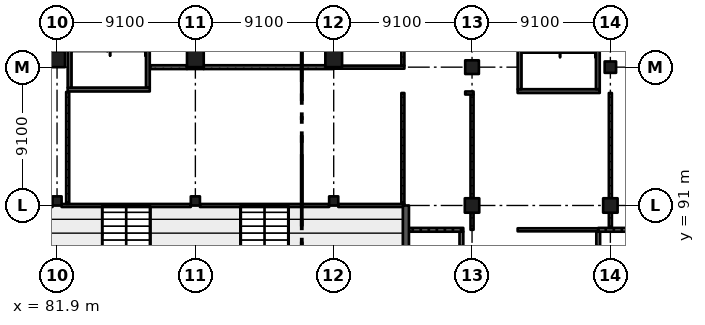
"""IFC4 building model, lengths in metres.
Left out: names, types, materials, properties, quantities, classifications, styles, units other than length and angle.
Written with IfcOpenShell. Run it as: python <this file> out.ifc"""

import sys

from ifc_helpers import new_model, si_unit, direction, frame, frame_2d, origin, origin_2d, place, context, subcontext, project, spatial, rectangle, extrude, element, fill, save


model = new_model("IFC4")
c1 = context("Model", 3, precision=1e-05, world=origin(), true_north=direction((0.0, 1.0)))
c2 = subcontext(c1, "Body", "Model", "MODEL_VIEW")
j1 = project(units=[si_unit("LENGTHUNIT", "METRE"), si_unit("PLANEANGLEUNIT", "RADIAN")], contexts=[c1])
p1 = place(None, origin())
s1 = spatial("IfcSite", under=j1, at=p1, CompositionType="ELEMENT")
p2 = place(p1, origin())
s2 = spatial("IfcBuilding", under=s1, at=p2, CompositionType="ELEMENT")
p3 = place(p2, origin())
s3 = spatial("IfcBuildingStorey", under=s2, at=p3, CompositionType="ELEMENT", Elevation=0.0)
p4 = place(p3, frame((81.9, 91.3, -0.4), z_axis=(0.0, 0.0, 1.0), x_axis=(1.0, 0.0, 0.0)))
e1 = element("IfcColumn", 1, at=p4, inside=s3, PredefinedType="COLUMN", context=c2, shape_type="SweptSolid", body=[
    extrude(rectangle(XDim=0.6, YDim=0.6, at=origin_2d()), origin(), (0.0, 0.0, 1.0), 6.77),
])
p5 = place(p3, frame((81.9, 100.625, -0.4), z_axis=(0.0, 0.0, 1.0), x_axis=(1.0, 0.0, 0.0)))
e2 = element("IfcColumn", 2, at=p5, inside=s3, PredefinedType="COLUMN", context=c2, shape_type="SweptSolid", body=[
    extrude(rectangle(XDim=1.05, YDim=1.05, at=origin_2d()), origin(), (0.0, 0.0, 1.0), 6.77),
])
p6 = place(p3, frame((91.0, 91.3, -0.4), z_axis=(0.0, 0.0, 1.0), x_axis=(1.0, 0.0, 0.0)))
e3 = element("IfcColumn", 3, at=p6, inside=s3, PredefinedType="COLUMN", context=c2, shape_type="SweptSolid", body=[
    extrude(rectangle(XDim=0.6, YDim=0.6, at=origin_2d()), origin(), (0.0, 0.0, 1.0), 6.77),
])
p7 = place(p3, frame((91.0, 100.65, -0.4), z_axis=(0.0, 0.0, 1.0), x_axis=(1.0, 0.0, 0.0)))
e4 = element("IfcColumn", 4, at=p7, inside=s3, PredefinedType="COLUMN", context=c2, shape_type="SweptSolid", body=[
    extrude(rectangle(XDim=1.1, YDim=1.1, at=origin_2d()), origin(), (0.0, 0.0, 1.0), 6.77),
])
p8 = place(p3, frame((100.1, 91.3, -0.4), z_axis=(0.0, 0.0, 1.0), x_axis=(1.0, 0.0, 0.0)))
e5 = element("IfcColumn", 5, at=p8, inside=s3, PredefinedType="COLUMN", context=c2, shape_type="SweptSolid", body=[
    extrude(rectangle(XDim=0.6, YDim=0.6, at=origin_2d()), origin(), (0.0, 0.0, 1.0), 6.77),
])
p9 = place(p3, frame((100.1, 100.65, -0.4), z_axis=(0.0, 0.0, 1.0), x_axis=(1.0, 0.0, 0.0)))
e6 = element("IfcColumn", 6, at=p9, inside=s3, PredefinedType="COLUMN", context=c2, shape_type="SweptSolid", body=[
    extrude(rectangle(XDim=1.1, YDim=1.1, at=origin_2d()), origin(), (0.0, 0.0, 1.0), 6.77),
])
p10 = place(p3, frame((109.2, 91.0, -0.4), z_axis=(0.0, 0.0, 1.0), x_axis=(1.0, 0.0, 0.0)))
e7 = element("IfcColumn", 7, at=p10, inside=s3, PredefinedType="COLUMN", context=c2, shape_type="SweptSolid", body=[
    extrude(rectangle(XDim=0.95, YDim=0.95, at=origin_2d()), origin(), (0.0, 0.0, 1.0), 6.77),
])
p11 = place(p3, frame((109.2, 100.1, -0.4), z_axis=(0.0, 0.0, 1.0), x_axis=(1.0, 0.0, 0.0)))
e8 = element("IfcColumn", 8, at=p11, inside=s3, PredefinedType="COLUMN", context=c2, shape_type="SweptSolid", body=[
    extrude(rectangle(XDim=0.9, YDim=0.9, at=origin_2d()), origin(), (0.0, 0.0, 1.0), 6.77),
])
p12 = place(p3, frame((118.3, 91.0, -0.4), z_axis=(0.0, 0.0, 1.0), x_axis=(1.0, 0.0, 0.0)))
e9 = element("IfcColumn", 9, at=p12, inside=s3, PredefinedType="COLUMN", context=c2, shape_type="SweptSolid", body=[
    extrude(rectangle(XDim=0.95, YDim=0.95, at=origin_2d()), origin(), (0.0, 0.0, 1.0), 6.77),
])
p13 = place(p3, frame((118.3, 100.1, -0.4), z_axis=(0.0, 0.0, 1.0), x_axis=(1.0, 0.0, 0.0)))
e10 = element("IfcColumn", 10, at=p13, inside=s3, PredefinedType="COLUMN", context=c2, shape_type="SweptSolid", body=[
    extrude(rectangle(XDim=0.75, YDim=0.75, at=origin_2d()), origin(), (0.0, 0.0, 1.0), 6.77),
])
p14 = place(p3, frame((104.85, 72.8, -0.4), z_axis=(0.0, 0.0, 1.0), x_axis=(0.0, 1.0, 0.0)))
e11 = element("IfcWall", 11, at=p14, inside=s3, PredefinedType="SHEAR", context=c2, shape_type="SweptSolid", body=[
    extrude(rectangle(XDim=18.2, YDim=0.4, at=frame_2d((9.1, 0.0))), origin(), (0.0, 0.0, 1.0), 6.77),
])
p15 = place(p3, frame((117.6, 98.525, -0.4), z_axis=(0.0, 0.0, 1.0), x_axis=(-1.0, 0.0, 0.0)))
e12 = element("IfcWall", 12, at=p15, inside=s3, PredefinedType="SHEAR", context=c2, shape_type="SweptSolid", body=[
    extrude(rectangle(XDim=5.4, YDim=0.25, at=frame_2d((2.7, 0.0))), origin(), (0.0, 0.0, 1.0), 6.77),
])
p16 = place(p15, frame((1.5, 0.0, 0.4)))
e13 = element("IfcOpeningElement", 13, at=p16, cuts=e12, PredefinedType="OPENING", context=c2, shape_type="SweptSolid", body=[
    extrude(rectangle(XDim=2.4, YDim=2.1, at=frame_2d((1.2, 1.05))), frame((0.0, 0.135, 0.0), z_axis=(0.0, -1.0, 0.0), x_axis=(1.0, 0.0, 0.0)), (0.0, 0.0, 1.0), 0.27),
])
p17 = place(p3, frame((112.325, 108.25, -0.4), z_axis=(0.0, 0.0, 1.0), x_axis=(0.0, -1.0, 0.0)))
e14 = element("IfcWall", 14, at=p17, inside=s3, PredefinedType="SHEAR", context=c2, shape_type="SweptSolid", body=[
    extrude(rectangle(XDim=9.6, YDim=0.25, at=frame_2d((4.8, 0.0))), origin(), (0.0, 0.0, 1.0), 6.77),
])
p18 = place(p17, frame((7.95, 0.0, 0.4)))
e15 = element("IfcOpeningElement", 15, at=p18, cuts=e14, PredefinedType="OPENING", context=c2, shape_type="SweptSolid", body=[
    extrude(rectangle(XDim=1.2, YDim=2.1, at=frame_2d((0.6, 1.05))), frame((0.0, 0.135, 0.0), z_axis=(0.0, -1.0, 0.0), x_axis=(1.0, 0.0, 0.0)), (0.0, 0.0, 1.0), 0.27),
])
p19 = place(p3, frame((117.475, 108.25, -0.4), z_axis=(0.0, 0.0, 1.0), x_axis=(0.0, -1.0, 0.0)))
e16 = element("IfcWall", 16, at=p19, inside=s3, PredefinedType="SHEAR", context=c2, shape_type="SweptSolid", body=[
    extrude(rectangle(XDim=9.6, YDim=0.25, at=frame_2d((4.8, 0.0))), origin(), (0.0, 0.0, 1.0), 6.77),
])
p20 = place(p3, frame((88.0, 98.625, -0.4), z_axis=(0.0, 0.0, 1.0), x_axis=(-1.0, 0.0, 0.0)))
e17 = element("IfcWall", 17, at=p20, inside=s3, PredefinedType="SHEAR", context=c2, shape_type="SweptSolid", body=[
    extrude(rectangle(XDim=5.4, YDim=0.25, at=frame_2d((2.7, 0.0))), origin(), (0.0, 0.0, 1.0), 6.77),
])
p21 = place(p20, frame((1.5, 0.0, 0.4)))
e18 = element("IfcOpeningElement", 18, at=p21, cuts=e17, PredefinedType="OPENING", context=c2, shape_type="SweptSolid", body=[
    extrude(rectangle(XDim=2.4, YDim=2.1, at=frame_2d((1.2, 1.05))), frame((0.0, 0.135, 0.0), z_axis=(0.0, -1.0, 0.0), x_axis=(1.0, 0.0, 0.0)), (0.0, 0.0, 1.0), 0.27),
])
for number, where, z_axis, x_axis in (
    (19, (82.725, 108.35, -0.4), (0.0, 0.0, 1.0), (0.0, -1.0, 0.0)),
    (20, (87.875, 108.35, -0.4), (0.0, 0.0, 1.0), (0.0, -1.0, 0.0)),
):
    element("IfcWall", number, at=place(p3, frame(where, z_axis=z_axis, x_axis=x_axis)), inside=s3, PredefinedType="SHEAR", context=c2, shape_type="SweptSolid", body=[
        extrude(rectangle(XDim=9.6, YDim=0.25, at=frame_2d((4.8, 0.0))), origin(), (0.0, 0.0, 1.0), 6.77),
    ])
p22 = place(p3, frame((82.2, 91.0, 0.0), z_axis=(0.0, 0.0, 1.0), x_axis=(1.0, 0.0, 0.0)))
e21 = element("IfcWall", 21, at=p22, inside=s3, PredefinedType="PARTITIONING", context=c2, shape_type="SweptSolid", body=[
    extrude(rectangle(XDim=8.5, YDim=0.2, at=frame_2d((4.25, 0.0))), origin(), (0.0, 0.0, 1.0), 5.02),
])
p23 = place(p3, frame((82.6, 98.47, 0.0), z_axis=(0.0, 0.0, 1.0), x_axis=(0.0, -1.0, 0.0)))
e22 = element("IfcWall", 22, at=p23, inside=s3, PredefinedType="PARTITIONING", context=c2, shape_type="SweptSolid", body=[
    extrude(rectangle(XDim=7.37, YDim=0.2, at=frame_2d((3.685, 0.0))), origin(), (0.0, 0.0, 1.0), 6.02),
])
p24 = place(p23, frame((2.15, 0.0, 0.0)))
e23 = element("IfcOpeningElement", 23, at=p24, cuts=e22, PredefinedType="OPENING", context=c2, shape_type="SweptSolid", body=[
    extrude(rectangle(XDim=3.0, YDim=2.4, at=frame_2d((1.5, 1.2))), frame((0.0, 0.11, 0.0), z_axis=(0.0, -1.0, 0.0), x_axis=(1.0, 0.0, 0.0)), (0.0, 0.0, 1.0), 0.22),
])
p25 = place(p3, frame((88.03, 100.1, 0.0), z_axis=(0.0, 0.0, 1.0), x_axis=(1.0, 0.0, 0.0)))
e24 = element("IfcWall", 24, at=p25, inside=s3, PredefinedType="SOLIDWALL", context=c2, shape_type="SweptSolid", body=[
    extrude(rectangle(XDim=2.42, YDim=0.25, at=frame_2d((1.21, 0.0))), origin(), (0.0, 0.0, 1.0), 5.57),
])
p26 = place(p3, frame((99.8, 91.0, 0.0), z_axis=(0.0, 0.0, 1.0), x_axis=(-1.0, 0.0, 0.0)))
e25 = element("IfcWall", 25, at=p26, inside=s3, PredefinedType="PARTITIONING", context=c2, shape_type="SweptSolid", body=[
    extrude(rectangle(XDim=8.5, YDim=0.2, at=frame_2d((4.25, 0.0))), origin(), (0.0, 0.0, 1.0), 5.02),
])
p27 = place(p3, frame((100.1, 100.1, 0.0), z_axis=(0.0, 0.0, 1.0), x_axis=(1.0, 0.0, 0.0)))
e26 = element("IfcWall", 26, at=p27, inside=s3, PredefinedType="PARTITIONING", context=c2, shape_type="SweptSolid", body=[
    extrude(rectangle(XDim=4.65, YDim=0.2, at=frame_2d((2.325, 0.0))), origin(), (0.0, 0.0, 1.0), 5.32),
])
p28 = place(p27, frame((1.85, 0.0, 0.0)))
e27 = element("IfcOpeningElement", 27, at=p28, cuts=e26, PredefinedType="OPENING", context=c2, shape_type="SweptSolid", body=[
    extrude(rectangle(XDim=1.0, YDim=2.1, at=frame_2d((0.5, 1.05))), frame((0.0, 0.11, 0.0), z_axis=(0.0, -1.0, 0.0), x_axis=(1.0, 0.0, 0.0)), (0.0, 0.0, 1.0), 0.22),
])
p29 = place(p3, frame((104.65, 91.1, 0.0), z_axis=(0.0, 0.0, 1.0), x_axis=(0.0, 1.0, 0.0)))
e28 = element("IfcWall", 28, at=p29, inside=s3, PredefinedType="PARTITIONING", context=c2, shape_type="SweptSolid", body=[
    extrude(rectangle(XDim=7.3, YDim=0.2, at=frame_2d((3.65, 0.0))), origin(), (0.0, 0.0, 1.0), 6.02),
])
p30 = place(p29, frame((0.95, 0.0, 0.0)))
e29 = element("IfcOpeningElement", 29, at=p30, cuts=e28, PredefinedType="OPENING", context=c2, shape_type="SweptSolid", body=[
    extrude(rectangle(XDim=1.8, YDim=2.4, at=frame_2d((0.9, 1.2))), frame((0.0, 0.11, 0.0), z_axis=(0.0, -1.0, 0.0), x_axis=(1.0, 0.0, 0.0)), (0.0, 0.0, 1.0), 0.22),
])
p31 = place(p29, frame((4.55, 0.0, 0.0)))
e30 = element("IfcOpeningElement", 30, at=p31, cuts=e28, PredefinedType="OPENING", context=c2, shape_type="SweptSolid", body=[
    extrude(rectangle(XDim=1.8, YDim=2.4, at=frame_2d((0.9, 1.2))), frame((0.0, 0.11, 0.0), z_axis=(0.0, -1.0, 0.0), x_axis=(1.0, 0.0, 0.0)), (0.0, 0.0, 1.0), 0.22),
])
p32 = place(p3, frame((104.65, 100.2, 0.0), z_axis=(0.0, 0.0, 1.0), x_axis=(0.0, 1.0, 0.0)))
e31 = element("IfcWall", 31, at=p32, inside=s3, PredefinedType="PARTITIONING", context=c2, shape_type="SweptSolid", body=[
    extrude(rectangle(XDim=8.85, YDim=0.2, at=frame_2d((4.425, 0.0))), origin(), (0.0, 0.0, 1.0), 6.02),
])
p33 = place(p3, frame((104.75, 91.0, 0.0), z_axis=(0.0, 0.0, 1.0), x_axis=(-1.0, 0.0, 0.0)))
e32 = element("IfcWall", 32, at=p33, inside=s3, PredefinedType="PARTITIONING", context=c2, shape_type="SweptSolid", body=[
    extrude(rectangle(XDim=4.35, YDim=0.2, at=frame_2d((2.175, 0.0))), origin(), (0.0, 0.0, 1.0), 5.02),
])
p34 = place(p3, frame((108.5, 82.325, 0.0), z_axis=(0.0, 0.0, 1.0), x_axis=(0.0, 1.0, 0.0)))
e33 = element("IfcWall", 33, at=p34, inside=s3, PredefinedType="SOLIDWALL", context=c2, shape_type="SweptSolid", body=[
    extrude(rectangle(XDim=6.95, YDim=0.25, at=frame_2d((3.475, 0.0))), origin(), (0.0, 0.0, 1.0), 6.02),
])
p35 = place(p3, frame((108.625, 89.4, 0.0), z_axis=(0.0, 0.0, 1.0), x_axis=(-1.0, 0.0, 0.0)))
e34 = element("IfcWall", 34, at=p35, inside=s3, PredefinedType="SOLIDWALL", context=c2, shape_type="SweptSolid", body=[
    extrude(rectangle(XDim=3.575, YDim=0.25, at=frame_2d((1.788, 0.0))), origin(), (0.0, 0.0, 1.0), 6.02),
])
p36 = place(p35, frame((1.35, 0.0, 0.0)))
e35 = element("IfcOpeningElement", 35, at=p36, cuts=e34, PredefinedType="OPENING", context=c2, shape_type="SweptSolid", body=[
    extrude(rectangle(XDim=0.8, YDim=2.1, at=frame_2d((0.4, 1.05))), frame((0.0, 0.135, 0.0), z_axis=(0.0, -1.0, 0.0), x_axis=(1.0, 0.0, 0.0)), (0.0, 0.0, 1.0), 0.27),
])
p37 = place(p3, frame((109.2, 89.4, 0.0), z_axis=(0.0, 0.0, 1.0), x_axis=(0.0, 1.0, 0.0)))
e36 = element("IfcWall", 36, at=p37, inside=s3, PredefinedType="PARTITIONING", context=c2, shape_type="SweptSolid", body=[
    extrude(rectangle(XDim=1.125, YDim=0.2, at=frame_2d((0.562, 0.0))), origin(), (0.0, 0.0, 1.0), 5.32),
])
p38 = place(p3, frame((109.2, 91.475, 0.0), z_axis=(0.0, 0.0, 1.0), x_axis=(0.0, 1.0, 0.0)))
e37 = element("IfcWall", 37, at=p38, inside=s3, PredefinedType="PARTITIONING", context=c2, shape_type="SweptSolid", body=[
    extrude(rectangle(XDim=6.825, YDim=0.2, at=frame_2d((3.413, 0.0))), origin(), (0.0, 0.0, 1.0), 5.32),
])
p39 = place(p38, frame((0.85, 0.0, 0.0)))
e38 = element("IfcOpeningElement", 38, at=p39, cuts=e37, PredefinedType="OPENING", context=c2, shape_type="SweptSolid", body=[
    extrude(rectangle(XDim=1.8, YDim=2.4, at=frame_2d((0.9, 1.2))), frame((0.0, 0.11, 0.0), z_axis=(0.0, -1.0, 0.0), x_axis=(1.0, 0.0, 0.0)), (0.0, 0.0, 1.0), 0.22),
])
p40 = place(p38, frame((4.25, 0.0, 0.0)))
e39 = element("IfcOpeningElement", 39, at=p40, cuts=e37, PredefinedType="OPENING", context=c2, shape_type="SweptSolid", body=[
    extrude(rectangle(XDim=1.8, YDim=2.4, at=frame_2d((0.9, 1.2))), frame((0.0, 0.11, 0.0), z_axis=(0.0, -1.0, 0.0), x_axis=(1.0, 0.0, 0.0)), (0.0, 0.0, 1.0), 0.22),
])
p41 = place(p3, frame((109.3, 98.4, 0.0), z_axis=(0.0, 0.0, 1.0), x_axis=(-1.0, 0.0, 0.0)))
e40 = element("IfcWall", 40, at=p41, inside=s3, PredefinedType="PARTITIONING", context=c2, shape_type="SweptSolid", body=[
    extrude(rectangle(XDim=0.55, YDim=0.2, at=frame_2d((0.275, 0.0))), origin(), (0.0, 0.0, 1.0), 6.02),
])
p42 = place(p3, frame((117.5, 86.43, 0.0), z_axis=(0.0, 0.0, 1.0), x_axis=(0.0, 1.0, 0.0)))
e41 = element("IfcWall", 41, at=p42, inside=s3, PredefinedType="SOLIDWALL", context=c2, shape_type="SweptSolid", body=[
    extrude(rectangle(XDim=2.845, YDim=0.25, at=frame_2d((1.422, 0.0))), origin(), (0.0, 0.0, 1.0), 6.02),
])
p43 = place(p3, frame((117.5, 89.4, 0.0), z_axis=(0.0, 0.0, 1.0), x_axis=(-1.0, 0.0, 0.0)))
e42 = element("IfcWall", 42, at=p43, inside=s3, PredefinedType="PARTITIONING", context=c2, shape_type="SweptSolid", body=[
    extrude(rectangle(XDim=5.3, YDim=0.2, at=frame_2d((2.65, 0.0))), origin(), (0.0, 0.0, 1.0), 6.02),
])
p44 = place(p43, frame((1.75, 0.0, 0.0)))
e43 = element("IfcOpeningElement", 43, at=p44, cuts=e42, PredefinedType="OPENING", context=c2, shape_type="SweptSolid", body=[
    extrude(rectangle(XDim=1.8, YDim=2.4, at=frame_2d((0.9, 1.2))), frame((0.0, 0.11, 0.0), z_axis=(0.0, -1.0, 0.0), x_axis=(1.0, 0.0, 0.0)), (0.0, 0.0, 1.0), 0.22),
])
p45 = place(p3, frame((117.5, 89.4, 0.0), z_axis=(0.0, 0.0, 1.0), x_axis=(1.0, 0.0, 0.0)))
e44 = element("IfcWall", 44, at=p45, inside=s3, PredefinedType="SOLIDWALL", context=c2, shape_type="SweptSolid", body=[
    extrude(rectangle(XDim=3.8, YDim=0.25, at=frame_2d((1.9, 0.0))), origin(), (0.0, 0.0, 1.0), 6.02),
])
p46 = place(p45, frame((1.75, 0.0, 0.0)))
e45 = element("IfcOpeningElement", 45, at=p46, cuts=e44, PredefinedType="OPENING", context=c2, shape_type="SweptSolid", body=[
    extrude(rectangle(XDim=1.0, YDim=2.1, at=frame_2d((0.5, 1.05))), frame((0.0, 0.135, 0.0), z_axis=(0.0, -1.0, 0.0), x_axis=(1.0, 0.0, 0.0)), (0.0, 0.0, 1.0), 0.27),
])
p47 = place(p3, frame((118.3, 89.525, 0.0), z_axis=(0.0, 0.0, 1.0), x_axis=(0.0, 1.0, 0.0)))
e46 = element("IfcWall", 46, at=p47, inside=s3, PredefinedType="PARTITIONING", context=c2, shape_type="SweptSolid", body=[
    extrude(rectangle(XDim=1.0, YDim=0.2, at=frame_2d((0.5, 0.0))), origin(), (0.0, 0.0, 1.0), 5.32),
])
p48 = place(p3, frame((118.3, 91.475, 0.0), z_axis=(0.0, 0.0, 1.0), x_axis=(0.0, 1.0, 0.0)))
e47 = element("IfcWall", 47, at=p48, inside=s3, PredefinedType="PARTITIONING", context=c2, shape_type="SweptSolid", body=[
    extrude(rectangle(XDim=6.925, YDim=0.2, at=frame_2d((3.462, 0.0))), origin(), (0.0, 0.0, 1.0), 5.32),
])
p49 = place(p48, frame((0.85, 0.0, 0.0)))
e48 = element("IfcOpeningElement", 48, at=p49, cuts=e47, PredefinedType="OPENING", context=c2, shape_type="SweptSolid", body=[
    extrude(rectangle(XDim=1.8, YDim=2.4, at=frame_2d((0.9, 1.2))), frame((0.0, 0.11, 0.0), z_axis=(0.0, -1.0, 0.0), x_axis=(1.0, 0.0, 0.0)), (0.0, 0.0, 1.0), 0.22),
])
p50 = place(p48, frame((4.25, 0.0, 0.0)))
e49 = element("IfcOpeningElement", 49, at=p50, cuts=e47, PredefinedType="OPENING", context=c2, shape_type="SweptSolid", body=[
    extrude(rectangle(XDim=1.8, YDim=2.4, at=frame_2d((0.9, 1.2))), frame((0.0, 0.11, 0.0), z_axis=(0.0, -1.0, 0.0), x_axis=(1.0, 0.0, 0.0)), (0.0, 0.0, 1.0), 0.22),
])
p51 = place(p3, frame((90.45, 100.1, 0.0), z_axis=(0.0, 0.0, 1.0), x_axis=(1.0, 0.0, 0.0)))
e50 = element("IfcWall", 50, at=p51, inside=s3, PredefinedType="SOLIDWALL", context=c2, shape_type="SweptSolid", body=[
    extrude(rectangle(XDim=1.1, YDim=0.25, at=frame_2d((0.55, 0.0))), origin(), (0.0, 0.0, 1.0), 6.02),
])
p52 = place(p3, frame((91.55, 100.1, 0.0), z_axis=(0.0, 0.0, 1.0), x_axis=(1.0, 0.0, 0.0)))
e51 = element("IfcWall", 51, at=p52, inside=s3, PredefinedType="SOLIDWALL", context=c2, shape_type="SweptSolid", body=[
    extrude(rectangle(XDim=8.55, YDim=0.25, at=frame_2d((4.275, 0.0))), origin(), (0.0, 0.0, 1.0), 5.32),
])
p53 = place(p52, frame((1.63, 0.0, 0.0)))
e52 = element("IfcOpeningElement", 52, at=p53, cuts=e51, PredefinedType="OPENING", context=c2, shape_type="SweptSolid", body=[
    extrude(rectangle(XDim=1.8, YDim=2.1, at=frame_2d((0.9, 1.05))), frame((0.0, 0.135, 0.0), z_axis=(0.0, -1.0, 0.0), x_axis=(1.0, 0.0, 0.0)), (0.0, 0.0, 1.0), 0.27),
])
p54 = place(p46, origin())
e53 = element("IfcDoor", 53, at=p54, inside=s3, OperationType="SINGLE_SWING_LEFT", PredefinedType="DOOR", context=c2, shape_type="SweptSolid", body=[
    extrude(rectangle(XDim=1.0, YDim=2.1, at=frame_2d((0.5, 1.05))), frame((0.0, 0.025, 0.0), z_axis=(0.0, -1.0, 0.0), x_axis=(1.0, 0.0, 0.0)), (0.0, 0.0, 1.0), 0.05),
])
fill(e45, e53)
p55 = place(p36, origin())
e54 = element("IfcDoor", 54, at=p55, inside=s3, OperationType="SINGLE_SWING_RIGHT", PredefinedType="DOOR", context=c2, shape_type="SweptSolid", body=[
    extrude(rectangle(XDim=0.8, YDim=2.1, at=frame_2d((0.4, 1.05))), frame((0.0, 0.025, 0.0), z_axis=(0.0, -1.0, 0.0), x_axis=(1.0, 0.0, 0.0)), (0.0, 0.0, 1.0), 0.05),
])
fill(e35, e54)
p56 = place(p53, origin())
e55 = element("IfcDoor", 55, at=p56, inside=s3, OperationType="DOUBLE_DOOR_SINGLE_SWING", PredefinedType="DOOR", context=c2, shape_type="SweptSolid", body=[
    extrude(rectangle(XDim=1.8, YDim=2.1, at=frame_2d((0.9, 1.05))), frame((0.0, 0.025, 0.0), z_axis=(0.0, -1.0, 0.0), x_axis=(1.0, 0.0, 0.0)), (0.0, 0.0, 1.0), 0.05),
])
fill(e52, e55)
p57 = place(p28, origin())
e56 = element("IfcDoor", 56, at=p57, inside=s3, OperationType="SINGLE_SWING_LEFT", PredefinedType="DOOR", context=c2, shape_type="SweptSolid", body=[
    extrude(rectangle(XDim=1.0, YDim=2.1, at=frame_2d((0.5, 1.05))), frame((0.0, 0.025, 0.0), z_axis=(0.0, -1.0, 0.0), x_axis=(1.0, 0.0, 0.0)), (0.0, 0.0, 1.0), 0.05),
])
fill(e27, e56)
p58 = place(p49, origin())
e57 = element("IfcDoor", 57, at=p58, inside=s3, OperationType="DOUBLE_DOOR_SINGLE_SWING", PredefinedType="DOOR", context=c2, shape_type="SweptSolid", body=[
    extrude(rectangle(XDim=1.8, YDim=2.4, at=frame_2d((0.9, 1.2))), frame((0.0, 0.025, 0.0), z_axis=(0.0, -1.0, 0.0), x_axis=(1.0, 0.0, 0.0)), (0.0, 0.0, 1.0), 0.05),
])
fill(e48, e57)
p59 = place(p50, origin())
e58 = element("IfcDoor", 58, at=p59, inside=s3, OperationType="DOUBLE_DOOR_SINGLE_SWING", PredefinedType="DOOR", context=c2, shape_type="SweptSolid", body=[
    extrude(rectangle(XDim=1.8, YDim=2.4, at=frame_2d((0.9, 1.2))), frame((0.0, 0.025, 0.0), z_axis=(0.0, -1.0, 0.0), x_axis=(1.0, 0.0, 0.0)), (0.0, 0.0, 1.0), 0.05),
])
fill(e49, e58)
p60 = place(p39, origin())
e59 = element("IfcDoor", 59, at=p60, inside=s3, OperationType="DOUBLE_DOOR_SINGLE_SWING", PredefinedType="DOOR", context=c2, shape_type="SweptSolid", body=[
    extrude(rectangle(XDim=1.8, YDim=2.4, at=frame_2d((0.9, 1.2))), frame((0.0, 0.025, 0.0), z_axis=(0.0, -1.0, 0.0), x_axis=(1.0, 0.0, 0.0)), (0.0, 0.0, 1.0), 0.05),
])
fill(e38, e59)
p61 = place(p40, origin())
e60 = element("IfcDoor", 60, at=p61, inside=s3, OperationType="DOUBLE_DOOR_SINGLE_SWING", PredefinedType="DOOR", context=c2, shape_type="SweptSolid", body=[
    extrude(rectangle(XDim=1.8, YDim=2.4, at=frame_2d((0.9, 1.2))), frame((0.0, 0.025, 0.0), z_axis=(0.0, -1.0, 0.0), x_axis=(1.0, 0.0, 0.0)), (0.0, 0.0, 1.0), 0.05),
])
fill(e39, e60)
p62 = place(p44, origin())
e61 = element("IfcDoor", 61, at=p62, inside=s3, OperationType="DOUBLE_DOOR_SINGLE_SWING", PredefinedType="DOOR", context=c2, shape_type="SweptSolid", body=[
    extrude(rectangle(XDim=1.8, YDim=2.4, at=frame_2d((0.9, 1.2))), frame((0.0, 0.025, 0.0), z_axis=(0.0, -1.0, 0.0), x_axis=(1.0, 0.0, 0.0)), (0.0, 0.0, 1.0), 0.05),
])
fill(e43, e61)
p63 = place(p30, origin())
e62 = element("IfcDoor", 62, at=p63, inside=s3, OperationType="DOUBLE_DOOR_SINGLE_SWING", PredefinedType="DOOR", context=c2, shape_type="SweptSolid", body=[
    extrude(rectangle(XDim=1.8, YDim=2.4, at=frame_2d((0.9, 1.2))), frame((0.0, 0.025, 0.0), z_axis=(0.0, -1.0, 0.0), x_axis=(1.0, 0.0, 0.0)), (0.0, 0.0, 1.0), 0.05),
])
fill(e29, e62)
p64 = place(p31, origin())
e63 = element("IfcDoor", 63, at=p64, inside=s3, OperationType="DOUBLE_DOOR_SINGLE_SWING", PredefinedType="DOOR", context=c2, shape_type="SweptSolid", body=[
    extrude(rectangle(XDim=1.8, YDim=2.4, at=frame_2d((0.9, 1.2))), frame((0.0, 0.025, 0.0), z_axis=(0.0, -1.0, 0.0), x_axis=(1.0, 0.0, 0.0)), (0.0, 0.0, 1.0), 0.05),
])
fill(e30, e63)
p65 = place(p24, origin())
e64 = element("IfcDoor", 64, at=p65, inside=s3, OperationType="DOUBLE_DOOR_SINGLE_SWING", PredefinedType="DOOR", context=c2, shape_type="SweptSolid", body=[
    extrude(rectangle(XDim=3.0, YDim=2.4, at=frame_2d((1.5, 1.2))), frame((0.0, 0.025, 0.0), z_axis=(0.0, -1.0, 0.0), x_axis=(1.0, 0.0, 0.0)), (0.0, 0.0, 1.0), 0.05),
])
fill(e23, e64)
p66 = place(p16, origin())
e65 = element("IfcDoor", 65, at=p66, inside=s3, OperationType="DOUBLE_DOOR_SINGLE_SWING", PredefinedType="DOOR", context=c2, shape_type="SweptSolid", body=[
    extrude(rectangle(XDim=2.4, YDim=2.1, at=frame_2d((1.2, 1.05))), frame((0.0, 0.025, 0.0), z_axis=(0.0, -1.0, 0.0), x_axis=(1.0, 0.0, 0.0)), (0.0, 0.0, 1.0), 0.05),
])
fill(e13, e65)
p67 = place(p21, origin())
e66 = element("IfcDoor", 66, at=p67, inside=s3, OperationType="DOUBLE_DOOR_SINGLE_SWING", PredefinedType="DOOR", context=c2, shape_type="SweptSolid", body=[
    extrude(rectangle(XDim=2.4, YDim=2.1, at=frame_2d((1.2, 1.05))), frame((0.0, 0.025, 0.0), z_axis=(0.0, -1.0, 0.0), x_axis=(1.0, 0.0, 0.0)), (0.0, 0.0, 1.0), 0.05),
])
fill(e18, e66)
p68 = place(p18, origin())
e67 = element("IfcDoor", 67, at=p68, inside=s3, OperationType="SINGLE_SWING_RIGHT", PredefinedType="DOOR", context=c2, shape_type="SweptSolid", body=[
    extrude(rectangle(XDim=1.2, YDim=2.1, at=frame_2d((0.6, 1.05))), frame((0.0, 0.025, 0.0), z_axis=(0.0, -1.0, 0.0), x_axis=(1.0, 0.0, 0.0)), (0.0, 0.0, 1.0), 0.05),
])
fill(e15, e67)
save(model, sys.argv[1])
